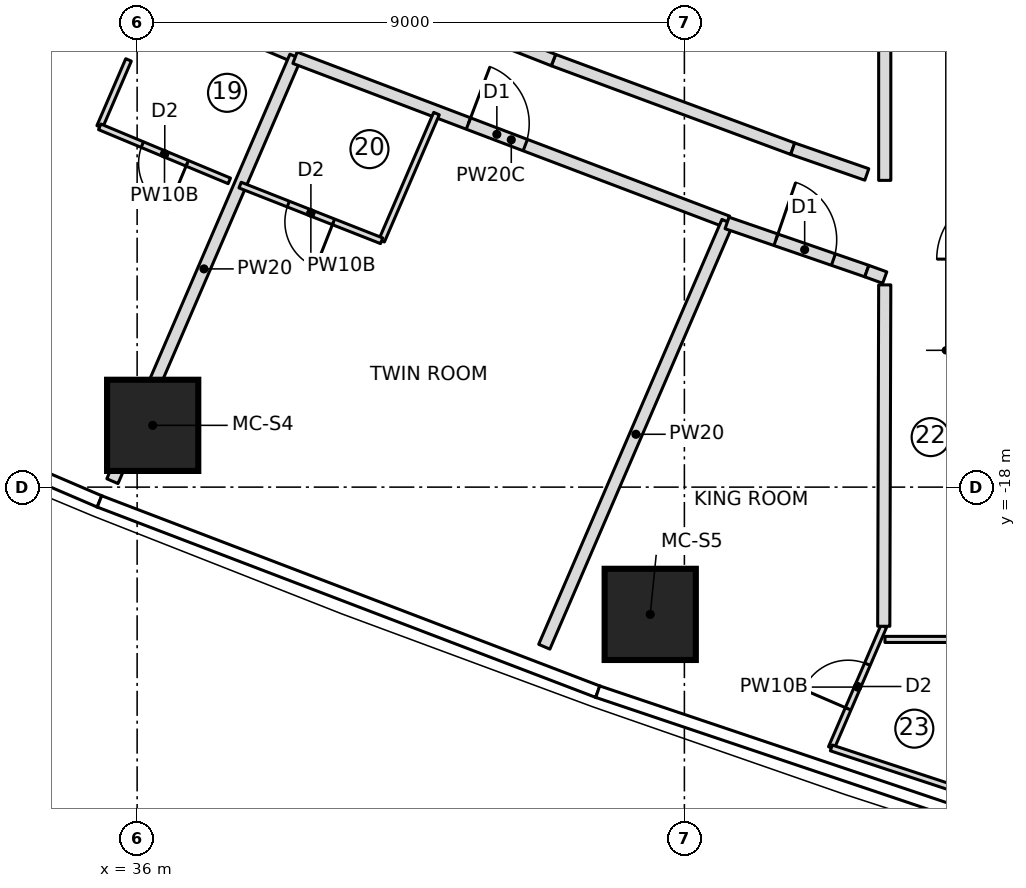
"""IFC4 building model, lengths in metres.
Left out: names, types, materials, properties, quantities, classifications, styles, units other than length and angle.
Written with IfcOpenShell. Run it as: python <this file> out.ifc"""

import sys

from ifc_helpers import new_model, si_unit, direction, frame, frame_2d, origin, origin_2d, place, context, subcontext, project, spatial, rectangle, extrude, element, fill, save


model = new_model("IFC4")
c1 = context("Model", 3, precision=1e-05, world=origin(), true_north=direction((0.0, 1.0)))
c2 = subcontext(c1, "Body", "Model", "MODEL_VIEW")
j1 = project(units=[si_unit("LENGTHUNIT", "METRE"), si_unit("PLANEANGLEUNIT", "RADIAN")], contexts=[c1])
p1 = place(None, origin())
s1 = spatial("IfcSite", under=j1, at=p1, CompositionType="ELEMENT")
p2 = place(p1, origin())
s2 = spatial("IfcBuilding", under=s1, at=p2, CompositionType="ELEMENT")
p3 = place(p2, frame((0.0, 0.0, 158.6)))
s3 = spatial("IfcBuildingStorey", under=s2, at=p3, CompositionType="ELEMENT", Elevation=158.6)
for number, where, z_axis, x_axis in (
    (1, (36.256, -16.984, 0.0), (0.0, 0.0, 1.0), (1.0, 0.0, 0.0)),
    (2, (44.438, -20.093, 0.0), (0.0, 0.0, 1.0), (1.0, 0.0, 0.0)),
):
    element("IfcColumn", number, at=place(p3, frame(where, z_axis=z_axis, x_axis=x_axis)), inside=s3, PredefinedType="COLUMN", context=c2, shape_type="SweptSolid", body=[
        extrude(rectangle(XDim=1.5, YDim=1.5, at=origin_2d()), origin(), (0.0, 0.0, 1.0), 3.55),
    ])
p4 = place(p3, frame((31.604, -7.96, 0.0), z_axis=(0.0, 0.0, 1.0), x_axis=(0.921069634751, -0.389397904386, 0.0)))
e3 = element("IfcWall", 3, at=p4, inside=s3, PredefinedType="PARTITIONING", context=c2, shape_type="SweptSolid", body=[
    extrude(rectangle(XDim=7.6, YDim=0.2, at=frame_2d((3.8, 0.0))), origin(), (0.0, 0.0, 1.0), 3.25),
])
p5 = place(p4, frame((0.35, 0.0, 0.0)))
e4 = element("IfcOpeningElement", 4, at=p5, cuts=e3, PredefinedType="OPENING", context=c2, shape_type="SweptSolid", body=[
    extrude(rectangle(XDim=1.0, YDim=2.1, at=frame_2d((0.5, 1.05))), frame((0.0, 0.11, 0.0), z_axis=(0.0, -1.0, 0.0), x_axis=(1.0, 0.0, 0.0)), (0.0, 0.0, 1.0), 0.22),
])
p6 = place(p3, frame((35.384, -12.074, 0.0), z_axis=(0.0, 0.0, 1.0), x_axis=(0.396057430794, 0.918225741043, 0.0)))
e5 = element("IfcWall", 5, at=p6, inside=s3, PredefinedType="PARTITIONING", context=c2, shape_type="SweptSolid", body=[
    extrude(rectangle(XDim=1.198, YDim=0.1, at=frame_2d((0.599, 0.0))), origin(), (0.0, 0.0, 1.0), 3.25),
])
p7 = place(p3, frame((37.516, -12.963, 0.0), z_axis=(0.0, 0.0, 1.0), x_axis=(-0.923014363649, 0.384765492863, 0.0)))
e6 = element("IfcWall", 6, at=p7, inside=s3, PredefinedType="PARTITIONING", context=c2, shape_type="SweptSolid", body=[
    extrude(rectangle(XDim=2.31, YDim=0.1, at=frame_2d((1.155, 0.0))), origin(), (0.0, 0.0, 1.0), 3.25),
])
p8 = place(p7, frame((0.75, 0.0, 0.0)))
e7 = element("IfcOpeningElement", 7, at=p8, cuts=e6, PredefinedType="OPENING", context=c2, shape_type="SweptSolid", body=[
    extrude(rectangle(XDim=0.8, YDim=2.1, at=frame_2d((0.4, 1.05))), frame((0.0, 0.06, 0.0), z_axis=(0.0, -1.0, 0.0), x_axis=(1.0, 0.0, 0.0)), (0.0, 0.0, 1.0), 0.12),
])
p9 = place(p3, frame((35.594, -17.902, 0.0), z_axis=(0.0, 0.0, 1.0), x_axis=(0.395975928923, 0.918260890877, 0.0)))
e8 = element("IfcWall", 8, at=p9, inside=s3, PredefinedType="PARTITIONING", context=c2, shape_type="SweptSolid", body=[
    extrude(rectangle(XDim=7.604, YDim=0.2, at=frame_2d((3.802, 0.0))), origin(), (0.0, 0.0, 1.0), 3.25),
])
p10 = place(p3, frame((38.597, -10.938, 0.0), z_axis=(0.0, 0.0, 1.0), x_axis=(0.934963762263, -0.354743235672, 0.0)))
e9 = element("IfcWall", 9, at=p10, inside=s3, PredefinedType="PARTITIONING", context=c2, shape_type="SweptSolid", body=[
    extrude(rectangle(XDim=7.608, YDim=0.2, at=frame_2d((3.804, 0.0))), origin(), (0.0, 0.0, 1.0), 3.25),
])
p11 = place(p10, frame((3.05, 0.0, 0.0)))
e10 = element("IfcOpeningElement", 10, at=p11, cuts=e9, PredefinedType="OPENING", context=c2, shape_type="SweptSolid", body=[
    extrude(rectangle(XDim=1.0, YDim=2.1, at=frame_2d((0.5, 1.05))), frame((0.0, 0.11, 0.0), z_axis=(0.0, -1.0, 0.0), x_axis=(1.0, 0.0, 0.0)), (0.0, 0.0, 1.0), 0.22),
])
p12 = place(p3, frame((40.923, -11.856, 0.0), z_axis=(0.0, 0.0, 1.0), x_axis=(-0.39596178423, -0.918266990275, 0.0)))
e11 = element("IfcWall", 11, at=p12, inside=s3, PredefinedType="PARTITIONING", context=c2, shape_type="SweptSolid", body=[
    extrude(rectangle(XDim=2.278, YDim=0.1, at=frame_2d((1.139, 0.0))), origin(), (0.0, 0.0, 1.0), 3.25),
])
p13 = place(p3, frame((40.021, -13.948, 0.0), z_axis=(0.0, 0.0, 1.0), x_axis=(-0.930568677441, 0.366117380856, 0.0)))
e12 = element("IfcWall", 12, at=p13, inside=s3, PredefinedType="PARTITIONING", context=c2, shape_type="SweptSolid", body=[
    extrude(rectangle(XDim=2.501, YDim=0.1, at=frame_2d((1.25, 0.0))), origin(), (0.0, 0.0, 1.0), 3.25),
])
p14 = place(p13, frame((0.85, 0.0, 0.0)))
e13 = element("IfcOpeningElement", 13, at=p14, cuts=e12, PredefinedType="OPENING", context=c2, shape_type="SweptSolid", body=[
    extrude(rectangle(XDim=0.8, YDim=2.1, at=frame_2d((0.4, 1.05))), frame((0.0, 0.06, 0.0), z_axis=(0.0, -1.0, 0.0), x_axis=(1.0, 0.0, 0.0)), (0.0, 0.0, 1.0), 0.12),
])
p15 = place(p3, frame((42.696, -20.625, 0.0), z_axis=(0.0, 0.0, 1.0), x_axis=(0.395993528256, 0.918253301426, 0.0)))
e14 = element("IfcWall", 14, at=p15, inside=s3, PredefinedType="PARTITIONING", context=c2, shape_type="SweptSolid", body=[
    extrude(rectangle(XDim=7.61, YDim=0.2, at=frame_2d((3.805, 0.0))), origin(), (0.0, 0.0, 1.0), 3.25),
])
p16 = place(p3, frame((47.416, -22.289, 0.0), z_axis=(0.0, 0.0, 1.0), x_axis=(0.396028123143, 0.918238381729, 0.0)))
e15 = element("IfcWall", 15, at=p16, inside=s3, PredefinedType="PARTITIONING", context=c2, shape_type="SweptSolid", body=[
    extrude(rectangle(XDim=2.179, YDim=0.1, at=frame_2d((1.089, 0.0))), origin(), (0.0, 0.0, 1.0), 3.25),
])
p17 = place(p16, frame((0.7, 0.0, 0.0)))
e16 = element("IfcOpeningElement", 16, at=p17, cuts=e15, PredefinedType="OPENING", context=c2, shape_type="SweptSolid", body=[
    extrude(rectangle(XDim=0.8, YDim=2.1, at=frame_2d((0.4, 1.05))), frame((0.0, 0.06, 0.0), z_axis=(0.0, -1.0, 0.0), x_axis=(1.0, 0.0, 0.0)), (0.0, 0.0, 1.0), 0.12),
])
p18 = place(p3, frame((46.781, -12.434, 0.0), z_axis=(0.0, 0.0, 1.0), x_axis=(-0.937732614305, 0.347357948044, 0.0)))
e17 = element("IfcWall", 17, at=p18, inside=s3, PredefinedType="PARTITIONING", context=c2, shape_type="SweptSolid", body=[
    extrude(rectangle(XDim=4.195, YDim=0.2, at=frame_2d((2.098, 0.0))), origin(), (0.0, 0.0, 1.0), 3.25),
])
p19 = place(p3, frame((42.847, -10.977, 0.0), z_axis=(0.0, 0.0, 1.0), x_axis=(-0.930586875578, 0.366071122873, 0.0)))
e18 = element("IfcWall", 18, at=p19, inside=s3, PredefinedType="PARTITIONING", context=c2, shape_type="SweptSolid", body=[
    extrude(rectangle(XDim=4.04, YDim=0.2, at=frame_2d((2.02, 0.0))), origin(), (0.0, 0.0, 1.0), 3.25),
])
p20 = place(p3, frame((48.299, -20.505, 0.0), z_axis=(0.0, 0.0, 1.0), x_axis=(1.0, 0.0, 0.0)))
e19 = element("IfcWall", 19, at=p20, inside=s3, PredefinedType="PARTITIONING", context=c2, shape_type="SweptSolid", body=[
    extrude(rectangle(XDim=1.135, YDim=0.1, at=frame_2d((0.568, 0.0))), origin(), (0.0, 0.0, 1.0), 3.25),
])
p21 = place(p3, frame((49.8, -23.074, 0.0), z_axis=(0.0, 0.0, 1.0), x_axis=(-0.949844078437, 0.312723882455, 0.0)))
e20 = element("IfcWall", 20, at=p21, inside=s3, PredefinedType="PARTITIONING", context=c2, shape_type="SweptSolid", body=[
    extrude(rectangle(XDim=2.51, YDim=0.1, at=frame_2d((1.255, 0.0))), origin(), (0.0, 0.0, 1.0), 3.25),
])
p22 = place(p3, frame((45.702, -13.655, 0.0), z_axis=(0.0, 0.0, 1.0), x_axis=(0.945472196346, -0.325702818435, 0.0)))
e21 = element("IfcWall", 21, at=p22, inside=s3, PredefinedType="PARTITIONING", context=c2, shape_type="SweptSolid", body=[
    extrude(rectangle(XDim=2.431, YDim=0.2, at=frame_2d((1.215, 0.0))), origin(), (0.0, 0.0, 1.0), 3.25),
])
p23 = place(p22, frame((0.85, 0.0, 0.0)))
e22 = element("IfcOpeningElement", 22, at=p23, cuts=e21, PredefinedType="OPENING", context=c2, shape_type="SweptSolid", body=[
    extrude(rectangle(XDim=1.0, YDim=2.1, at=frame_2d((0.5, 1.05))), frame((0.0, 0.11, 0.0), z_axis=(0.0, -1.0, 0.0), x_axis=(1.0, 0.0, 0.0)), (0.0, 0.0, 1.0), 0.22),
])
p24 = place(p3, frame((48.0, -12.858, 0.0), z_axis=(0.0, 0.0, 1.0), x_axis=(-0.944517215109, 0.328461916152, 0.0)))
e23 = element("IfcWall", 23, at=p24, inside=s3, PredefinedType="PARTITIONING", context=c2, shape_type="SweptSolid", body=[
    extrude(rectangle(XDim=1.29, YDim=0.2, at=frame_2d((0.645, 0.0))), origin(), (0.0, 0.0, 1.0), 3.25),
])
p25 = place(p3, frame((48.295, 12.955, 0.0), z_axis=(0.0, 0.0, 1.0), x_axis=(0.0, -1.0, 0.0)))
e24 = element("IfcWall", 24, at=p25, inside=s3, PredefinedType="PARTITIONING", context=c2, shape_type="SweptSolid", body=[
    extrude(rectangle(XDim=25.91, YDim=0.2, at=frame_2d((12.955, 0.0))), origin(), (0.0, 0.0, 1.0), 3.25),
])
p26 = place(p3, frame((48.0, -14.447, 0.0), z_axis=(0.0, 0.0, 1.0), x_axis=(0.940111128087, -0.3408681077, 0.0)))
e25 = element("IfcWall", 25, at=p26, inside=s3, PredefinedType="PARTITIONING", context=c2, shape_type="SweptSolid", body=[
    extrude(rectangle(XDim=0.314, YDim=0.2, at=frame_2d((0.157, 0.0))), origin(), (0.0, 0.0, 1.0), 3.25),
])
p27 = place(p3, frame((48.295, -14.674, 0.0), z_axis=(0.0, 0.0, 1.0), x_axis=(-0.00286967817, -0.999995882465, 0.0)))
e26 = element("IfcWall", 26, at=p27, inside=s3, PredefinedType="PARTITIONING", context=c2, shape_type="SweptSolid", body=[
    extrude(rectangle(XDim=5.615, YDim=0.2, at=frame_2d((2.808, 0.0))), origin(), (0.0, 0.0, 1.0), 3.25),
])
p28 = place(p8, origin())
e27 = element("IfcDoor", 27, at=p28, inside=s3, OperationType="SINGLE_SWING_LEFT", PredefinedType="DOOR", context=c2, shape_type="SweptSolid", body=[
    extrude(rectangle(XDim=0.8, YDim=2.1, at=frame_2d((0.4, 1.05))), frame((0.0, 0.025, 0.0), z_axis=(0.0, -1.0, 0.0), x_axis=(1.0, 0.0, 0.0)), (0.0, 0.0, 1.0), 0.05),
])
fill(e7, e27)
p29 = place(p14, origin())
e28 = element("IfcDoor", 28, at=p29, inside=s3, OperationType="SINGLE_SWING_LEFT", PredefinedType="DOOR", context=c2, shape_type="SweptSolid", body=[
    extrude(rectangle(XDim=0.8, YDim=2.1, at=frame_2d((0.4, 1.05))), frame((0.0, 0.025, 0.0), z_axis=(0.0, -1.0, 0.0), x_axis=(1.0, 0.0, 0.0)), (0.0, 0.0, 1.0), 0.05),
])
fill(e13, e28)
p30 = place(p11, origin())
e29 = element("IfcDoor", 29, at=p30, inside=s3, OperationType="SINGLE_SWING_LEFT", PredefinedType="DOOR", context=c2, shape_type="SweptSolid", body=[
    extrude(rectangle(XDim=1.0, YDim=2.1, at=frame_2d((0.5, 1.05))), frame((0.0, 0.025, 0.0), z_axis=(0.0, -1.0, 0.0), x_axis=(1.0, 0.0, 0.0)), (0.0, 0.0, 1.0), 0.05),
])
fill(e10, e29)
p31 = place(p17, origin())
e30 = element("IfcDoor", 30, at=p31, inside=s3, OperationType="SINGLE_SWING_LEFT", PredefinedType="DOOR", context=c2, shape_type="SweptSolid", body=[
    extrude(rectangle(XDim=0.8, YDim=2.1, at=frame_2d((0.4, 1.05))), frame((0.0, 0.025, 0.0), z_axis=(0.0, -1.0, 0.0), x_axis=(1.0, 0.0, 0.0)), (0.0, 0.0, 1.0), 0.05),
])
fill(e16, e30)
p32 = place(p23, origin())
e31 = element("IfcDoor", 31, at=p32, inside=s3, OperationType="SINGLE_SWING_LEFT", PredefinedType="DOOR", context=c2, shape_type="SweptSolid", body=[
    extrude(rectangle(XDim=1.0, YDim=2.1, at=frame_2d((0.5, 1.05))), frame((0.0, 0.025, 0.0), z_axis=(0.0, -1.0, 0.0), x_axis=(1.0, 0.0, 0.0)), (0.0, 0.0, 1.0), 0.05),
])
fill(e22, e31)
save(model, sys.argv[1])
